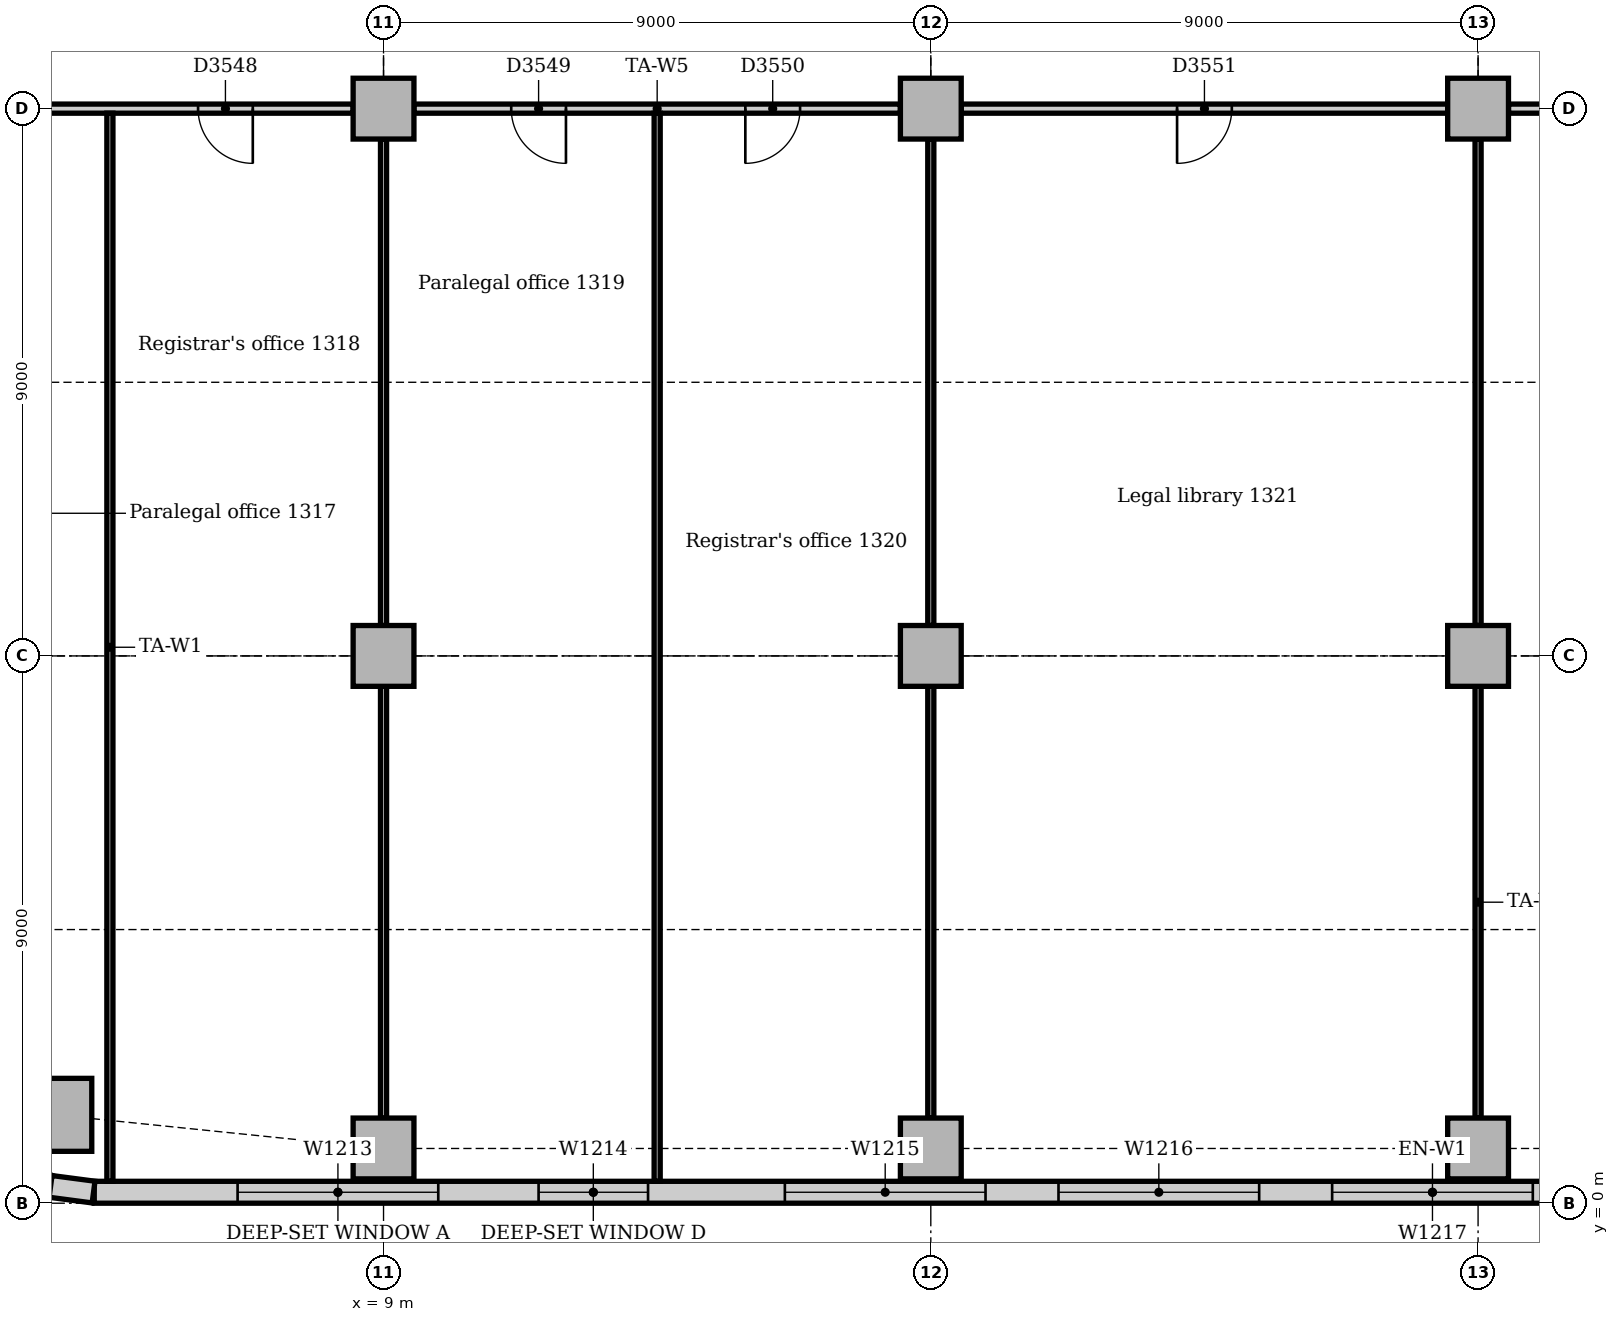
"""IFC4 building model, lengths in metres.
Left out: names, types, materials, properties, quantities, classifications, styles, units other than length and angle.
Written with IfcOpenShell. Run it as: python <this file> out.ifc"""

import sys

from ifc_helpers import new_model, si_unit, direction, frame, frame_2d, origin, origin_2d, place, context, subcontext, project, spatial, rectangle, extrude, element, fill, save


model = new_model("IFC4")
c1 = context("Model", 3, precision=1e-05, world=origin(), true_north=direction((0.0, 1.0)))
c2 = subcontext(c1, "Body", "Model", "MODEL_VIEW")
j1 = project(units=[si_unit("LENGTHUNIT", "METRE"), si_unit("PLANEANGLEUNIT", "RADIAN")], contexts=[c1])
p1 = place(None, origin())
s1 = spatial("IfcSite", under=j1, at=p1, CompositionType="ELEMENT")
p2 = place(p1, origin())
s2 = spatial("IfcBuilding", under=s1, at=p2, CompositionType="ELEMENT")
p3 = place(p2, frame((0.0, 0.0, 59.0)))
s3 = spatial("IfcBuildingStorey", under=s2, at=p3, CompositionType="ELEMENT", Elevation=59.0)
p4 = place(p3, frame((3.602, 1.453, 0.0), z_axis=(0.0, 0.0, 1.0), x_axis=(1.0, 0.0, 0.0)))
e1 = element("IfcColumn", 1, at=p4, inside=s3, PredefinedType="COLUMN", context=c2, shape_type="SweptSolid", body=[
    extrude(rectangle(XDim=1.2, YDim=1.2, at=origin_2d()), origin(), (0.0, 0.0, 1.0), 3.85),
])
for number, where, z_axis, x_axis in (
    (2, (9.0, 0.9, 0.0), (0.0, 0.0, 1.0), (1.0, 0.0, 0.0)),
    (3, (18.0, 0.9, 0.0), (0.0, 0.0, 1.0), (1.0, 0.0, 0.0)),
    (4, (27.0, 0.9, 0.0), (0.0, 0.0, 1.0), (1.0, 0.0, 0.0)),
    (5, (9.0, 9.0, 0.0), (0.0, 0.0, 1.0), (1.0, 0.0, 0.0)),
    (6, (9.0, 18.0, 0.0), (0.0, 0.0, 1.0), (1.0, 0.0, 0.0)),
    (7, (18.0, 9.0, 0.0), (0.0, 0.0, 1.0), (1.0, 0.0, 0.0)),
    (8, (18.0, 18.0, 0.0), (0.0, 0.0, 1.0), (1.0, 0.0, 0.0)),
    (9, (27.0, 9.0, 0.0), (0.0, 0.0, 1.0), (1.0, 0.0, 0.0)),
    (10, (27.0, 18.0, 0.0), (0.0, 0.0, 1.0), (1.0, 0.0, 0.0)),
):
    element("IfcColumn", number, at=place(p3, frame(where, z_axis=z_axis, x_axis=x_axis)), inside=s3, PredefinedType="COLUMN", context=c2, shape_type="SweptSolid", body=[
        extrude(rectangle(XDim=1.0, YDim=1.0, at=origin_2d()), origin(), (0.0, 0.0, 1.0), 3.85),
    ])
p5 = place(p3, frame((4.243, 0.18, 0.0), z_axis=(0.0, 0.0, 1.0), x_axis=(1.0, 0.0, 0.0)))
e11 = element("IfcWall", 11, at=p5, inside=s3, PredefinedType="STANDARD", context=c2, shape_type="SweptSolid", body=[
    extrude(rectangle(XDim=44.015, YDim=0.36, at=frame_2d((22.007, 0.0))), origin(), (0.0, 0.0, 1.0), 3.85),
])
p6 = place(p5, frame((2.357, 0.0, 0.9)))
e12 = element("IfcOpeningElement", 12, at=p6, cuts=e11, PredefinedType="OPENING", context=c2, shape_type="SweptSolid", body=[
    extrude(rectangle(XDim=3.3, YDim=1.6, at=frame_2d((1.65, 0.8))), frame((0.0, 0.19, 0.0), z_axis=(0.0, -1.0, 0.0), x_axis=(1.0, 0.0, 0.0)), (0.0, 0.0, 1.0), 0.38),
])
p7 = place(p5, frame((7.307, 0.0, 0.9)))
e13 = element("IfcOpeningElement", 13, at=p7, cuts=e11, PredefinedType="OPENING", context=c2, shape_type="SweptSolid", body=[
    extrude(rectangle(XDim=1.8, YDim=1.6, at=frame_2d((0.9, 0.8))), frame((0.0, 0.19, 0.0), z_axis=(0.0, -1.0, 0.0), x_axis=(1.0, 0.0, 0.0)), (0.0, 0.0, 1.0), 0.38),
])
p8 = place(p5, frame((11.357, 0.0, 0.9)))
e14 = element("IfcOpeningElement", 14, at=p8, cuts=e11, PredefinedType="OPENING", context=c2, shape_type="SweptSolid", body=[
    extrude(rectangle(XDim=3.3, YDim=1.6, at=frame_2d((1.65, 0.8))), frame((0.0, 0.19, 0.0), z_axis=(0.0, -1.0, 0.0), x_axis=(1.0, 0.0, 0.0)), (0.0, 0.0, 1.0), 0.38),
])
p9 = place(p5, frame((15.857, 0.0, 0.9)))
e15 = element("IfcOpeningElement", 15, at=p9, cuts=e11, PredefinedType="OPENING", context=c2, shape_type="SweptSolid", body=[
    extrude(rectangle(XDim=3.3, YDim=1.6, at=frame_2d((1.65, 0.8))), frame((0.0, 0.19, 0.0), z_axis=(0.0, -1.0, 0.0), x_axis=(1.0, 0.0, 0.0)), (0.0, 0.0, 1.0), 0.38),
])
p10 = place(p5, frame((20.357, 0.0, 0.9)))
e16 = element("IfcOpeningElement", 16, at=p10, cuts=e11, PredefinedType="OPENING", context=c2, shape_type="SweptSolid", body=[
    extrude(rectangle(XDim=3.3, YDim=1.6, at=frame_2d((1.65, 0.8))), frame((0.0, 0.19, 0.0), z_axis=(0.0, -1.0, 0.0), x_axis=(1.0, 0.0, 0.0)), (0.0, 0.0, 1.0), 0.38),
])
p11 = place(p5, frame((24.857, 0.0, 0.9)))
e17 = element("IfcOpeningElement", 17, at=p11, cuts=e11, PredefinedType="OPENING", context=c2, shape_type="SweptSolid", body=[
    extrude(rectangle(XDim=3.3, YDim=1.6, at=frame_2d((1.65, 0.8))), frame((0.0, 0.19, 0.0), z_axis=(0.0, -1.0, 0.0), x_axis=(1.0, 0.0, 0.0)), (0.0, 0.0, 1.0), 0.38),
])
p12 = place(p5, frame((29.357, 0.0, 0.9)))
e18 = element("IfcOpeningElement", 18, at=p12, cuts=e11, PredefinedType="OPENING", context=c2, shape_type="SweptSolid", body=[
    extrude(rectangle(XDim=3.3, YDim=1.6, at=frame_2d((1.65, 0.8))), frame((0.0, 0.19, 0.0), z_axis=(0.0, -1.0, 0.0), x_axis=(1.0, 0.0, 0.0)), (0.0, 0.0, 1.0), 0.38),
])
p13 = place(p5, frame((34.307, 0.0, 0.9)))
e19 = element("IfcOpeningElement", 19, at=p13, cuts=e11, PredefinedType="OPENING", context=c2, shape_type="SweptSolid", body=[
    extrude(rectangle(XDim=1.8, YDim=1.6, at=frame_2d((0.9, 0.8))), frame((0.0, 0.19, 0.0), z_axis=(0.0, -1.0, 0.0), x_axis=(1.0, 0.0, 0.0)), (0.0, 0.0, 1.0), 0.38),
])
p14 = place(p5, frame((38.357, 0.0, 0.9)))
e20 = element("IfcOpeningElement", 20, at=p14, cuts=e11, PredefinedType="OPENING", context=c2, shape_type="SweptSolid", body=[
    extrude(rectangle(XDim=3.3, YDim=1.6, at=frame_2d((1.65, 0.8))), frame((0.0, 0.19, 0.0), z_axis=(0.0, -1.0, 0.0), x_axis=(1.0, 0.0, 0.0)), (0.0, 0.0, 1.0), 0.38),
])
for number, where, z_axis, x_axis in (
    (21, (2.844, 0.555, 0.0), (0.0, 0.0, 1.0), (0.924, -0.383, 0.0)),
    (22, (3.524, 0.276, 0.0), (0.0, 0.0, 1.0), (0.991, -0.131, 0.0)),
):
    element("IfcWall", number, at=place(p3, frame(where, z_axis=z_axis, x_axis=x_axis)), inside=s3, PredefinedType="STANDARD", context=c2, shape_type="SweptSolid", body=[
        extrude(rectangle(XDim=0.713, YDim=0.36, at=frame_2d((0.356, 0.0))), origin(), (0.0, 0.0, 1.0), 3.85),
    ])
p15 = place(p3, frame((27.5, 18.0, 0.0), z_axis=(0.0, 0.0, 1.0), x_axis=(1.0, 0.0, 0.0)))
e23 = element("IfcWall", 23, at=p15, inside=s3, PredefinedType="PARTITIONING", context=c2, shape_type="SweptSolid", body=[
    extrude(rectangle(XDim=8.0, YDim=0.15, at=frame_2d((4.0, 0.0))), origin(), (0.0, 0.0, 1.0), 3.15),
])
p16 = place(p15, frame((3.55, 0.0, 0.0)))
e24 = element("IfcOpeningElement", 24, at=p16, cuts=e23, PredefinedType="OPENING", context=c2, shape_type="SweptSolid", body=[
    extrude(rectangle(XDim=0.9, YDim=2.1, at=frame_2d((0.45, 1.05))), frame((0.0, 0.085, 0.0), z_axis=(0.0, -1.0, 0.0), x_axis=(1.0, 0.0, 0.0)), (0.0, 0.0, 1.0), 0.17),
])
p17 = place(p3, frame((18.5, 18.0, 0.0), z_axis=(0.0, 0.0, 1.0), x_axis=(1.0, 0.0, 0.0)))
e25 = element("IfcWall", 25, at=p17, inside=s3, PredefinedType="PARTITIONING", context=c2, shape_type="SweptSolid", body=[
    extrude(rectangle(XDim=8.0, YDim=0.15, at=frame_2d((4.0, 0.0))), origin(), (0.0, 0.0, 1.0), 3.15),
])
p18 = place(p17, frame((3.55, 0.0, 0.0)))
e26 = element("IfcOpeningElement", 26, at=p18, cuts=e25, PredefinedType="OPENING", context=c2, shape_type="SweptSolid", body=[
    extrude(rectangle(XDim=0.9, YDim=2.1, at=frame_2d((0.45, 1.05))), frame((0.0, 0.085, 0.0), z_axis=(0.0, -1.0, 0.0), x_axis=(1.0, 0.0, 0.0)), (0.0, 0.0, 1.0), 0.17),
])
p19 = place(p3, frame((9.5, 18.0, 0.0), z_axis=(0.0, 0.0, 1.0), x_axis=(1.0, 0.0, 0.0)))
e27 = element("IfcWall", 27, at=p19, inside=s3, PredefinedType="PARTITIONING", context=c2, shape_type="SweptSolid", body=[
    extrude(rectangle(XDim=8.0, YDim=0.15, at=frame_2d((4.0, 0.0))), origin(), (0.0, 0.0, 1.0), 3.15),
])
p20 = place(p19, frame((1.6, 0.0, 0.0)))
e28 = element("IfcOpeningElement", 28, at=p20, cuts=e27, PredefinedType="OPENING", context=c2, shape_type="SweptSolid", body=[
    extrude(rectangle(XDim=0.9, YDim=2.1, at=frame_2d((0.45, 1.05))), frame((0.0, 0.085, 0.0), z_axis=(0.0, -1.0, 0.0), x_axis=(1.0, 0.0, 0.0)), (0.0, 0.0, 1.0), 0.17),
])
p21 = place(p19, frame((5.45, 0.0, 0.0)))
e29 = element("IfcOpeningElement", 29, at=p21, cuts=e27, PredefinedType="OPENING", context=c2, shape_type="SweptSolid", body=[
    extrude(rectangle(XDim=0.9, YDim=2.1, at=frame_2d((0.45, 1.05))), frame((0.0, 0.085, 0.0), z_axis=(0.0, -1.0, 0.0), x_axis=(1.0, 0.0, 0.0)), (0.0, 0.0, 1.0), 0.17),
])
p22 = place(p3, frame((1.4, 18.0, 0.0), z_axis=(0.0, 0.0, 1.0), x_axis=(1.0, 0.0, 0.0)))
e30 = element("IfcWall", 30, at=p22, inside=s3, PredefinedType="PARTITIONING", context=c2, shape_type="SweptSolid", body=[
    extrude(rectangle(XDim=7.1, YDim=0.15, at=frame_2d((3.55, 0.0))), origin(), (0.0, 0.0, 1.0), 3.15),
])
p23 = place(p22, frame((1.15, 0.0, 0.0)))
e31 = element("IfcOpeningElement", 31, at=p23, cuts=e30, PredefinedType="OPENING", context=c2, shape_type="SweptSolid", body=[
    extrude(rectangle(XDim=0.9, YDim=2.1, at=frame_2d((0.45, 1.05))), frame((0.0, 0.085, 0.0), z_axis=(0.0, -1.0, 0.0), x_axis=(1.0, 0.0, 0.0)), (0.0, 0.0, 1.0), 0.17),
])
p24 = place(p22, frame((4.55, 0.0, 0.0)))
e32 = element("IfcOpeningElement", 32, at=p24, cuts=e30, PredefinedType="OPENING", context=c2, shape_type="SweptSolid", body=[
    extrude(rectangle(XDim=0.9, YDim=2.1, at=frame_2d((0.45, 1.05))), frame((0.0, 0.085, 0.0), z_axis=(0.0, -1.0, 0.0), x_axis=(1.0, 0.0, 0.0)), (0.0, 0.0, 1.0), 0.17),
])
p25 = place(p3, frame((4.5, 0.36, 0.0), z_axis=(0.0, 0.0, 1.0), x_axis=(0.0, 1.0, 0.0)))
e33 = element("IfcWall", 33, at=p25, inside=s3, PredefinedType="PARTITIONING", context=c2, shape_type="SweptSolid", body=[
    extrude(rectangle(XDim=17.565, YDim=0.1, at=frame_2d((8.783, 0.0))), origin(), (0.0, 0.0, 1.0), 3.85),
])
p26 = place(p3, frame((9.0, 1.4, 0.0), z_axis=(0.0, 0.0, 1.0), x_axis=(0.0, 1.0, 0.0)))
e34 = element("IfcWall", 34, at=p26, inside=s3, PredefinedType="PARTITIONING", context=c2, shape_type="SweptSolid", body=[
    extrude(rectangle(XDim=7.1, YDim=0.1, at=frame_2d((3.55, 0.0))), origin(), (0.0, 0.0, 1.0), 3.158),
])
p27 = place(p3, frame((9.0, 9.5, 0.0), z_axis=(0.0, 0.0, 1.0), x_axis=(0.0, 1.0, 0.0)))
e35 = element("IfcWall", 35, at=p27, inside=s3, PredefinedType="PARTITIONING", context=c2, shape_type="SweptSolid", body=[
    extrude(rectangle(XDim=8.0, YDim=0.1, at=frame_2d((4.0, 0.0))), origin(), (0.0, 0.0, 1.0), 3.158),
])
p28 = place(p3, frame((13.5, 0.36, 0.0), z_axis=(0.0, 0.0, 1.0), x_axis=(0.0, 1.0, 0.0)))
e36 = element("IfcWall", 36, at=p28, inside=s3, PredefinedType="PARTITIONING", context=c2, shape_type="SweptSolid", body=[
    extrude(rectangle(XDim=17.565, YDim=0.1, at=frame_2d((8.783, 0.0))), origin(), (0.0, 0.0, 1.0), 3.85),
])
p29 = place(p3, frame((18.0, 1.4, 0.0), z_axis=(0.0, 0.0, 1.0), x_axis=(0.0, 1.0, 0.0)))
e37 = element("IfcWall", 37, at=p29, inside=s3, PredefinedType="PARTITIONING", context=c2, shape_type="SweptSolid", body=[
    extrude(rectangle(XDim=7.1, YDim=0.1, at=frame_2d((3.55, 0.0))), origin(), (0.0, 0.0, 1.0), 3.158),
])
p30 = place(p3, frame((18.0, 9.5, 0.0), z_axis=(0.0, 0.0, 1.0), x_axis=(0.0, 1.0, 0.0)))
e38 = element("IfcWall", 38, at=p30, inside=s3, PredefinedType="PARTITIONING", context=c2, shape_type="SweptSolid", body=[
    extrude(rectangle(XDim=8.0, YDim=0.1, at=frame_2d((4.0, 0.0))), origin(), (0.0, 0.0, 1.0), 3.158),
])
p31 = place(p3, frame((27.0, 1.4, 0.0), z_axis=(0.0, 0.0, 1.0), x_axis=(0.0, 1.0, 0.0)))
e39 = element("IfcWall", 39, at=p31, inside=s3, PredefinedType="PARTITIONING", context=c2, shape_type="SweptSolid", body=[
    extrude(rectangle(XDim=7.1, YDim=0.1, at=frame_2d((3.55, 0.0))), origin(), (0.0, 0.0, 1.0), 3.158),
])
p32 = place(p3, frame((27.0, 9.5, 0.0), z_axis=(0.0, 0.0, 1.0), x_axis=(0.0, 1.0, 0.0)))
e40 = element("IfcWall", 40, at=p32, inside=s3, PredefinedType="PARTITIONING", context=c2, shape_type="SweptSolid", body=[
    extrude(rectangle(XDim=8.0, YDim=0.1, at=frame_2d((4.0, 0.0))), origin(), (0.0, 0.0, 1.0), 3.158),
])
p33 = place(p6, origin())
e41 = element("IfcWindow", 41, at=p33, inside=s3, PartitioningType="SINGLE_PANEL", PredefinedType="WINDOW", context=c2, shape_type="SweptSolid", body=[
    extrude(rectangle(XDim=3.3, YDim=1.6, at=frame_2d((1.65, 0.8))), frame((0.0, 0.13, 0.0), z_axis=(0.0, -1.0, 0.0), x_axis=(1.0, 0.0, 0.0)), (0.0, 0.0, 1.0), 0.06),
])
fill(e12, e41)
p34 = place(p7, origin())
e42 = element("IfcWindow", 42, at=p34, inside=s3, PartitioningType="SINGLE_PANEL", PredefinedType="WINDOW", context=c2, shape_type="SweptSolid", body=[
    extrude(rectangle(XDim=1.8, YDim=1.6, at=frame_2d((0.9, 0.8))), frame((0.0, 0.13, 0.0), z_axis=(0.0, -1.0, 0.0), x_axis=(1.0, 0.0, 0.0)), (0.0, 0.0, 1.0), 0.06),
])
fill(e13, e42)
p35 = place(p8, origin())
e43 = element("IfcWindow", 43, at=p35, inside=s3, PartitioningType="SINGLE_PANEL", PredefinedType="WINDOW", context=c2, shape_type="SweptSolid", body=[
    extrude(rectangle(XDim=3.3, YDim=1.6, at=frame_2d((1.65, 0.8))), frame((0.0, 0.13, 0.0), z_axis=(0.0, -1.0, 0.0), x_axis=(1.0, 0.0, 0.0)), (0.0, 0.0, 1.0), 0.06),
])
fill(e14, e43)
p36 = place(p9, origin())
e44 = element("IfcWindow", 44, at=p36, inside=s3, PartitioningType="SINGLE_PANEL", PredefinedType="WINDOW", context=c2, shape_type="SweptSolid", body=[
    extrude(rectangle(XDim=3.3, YDim=1.6, at=frame_2d((1.65, 0.8))), frame((0.0, 0.13, 0.0), z_axis=(0.0, -1.0, 0.0), x_axis=(1.0, 0.0, 0.0)), (0.0, 0.0, 1.0), 0.06),
])
fill(e15, e44)
p37 = place(p10, origin())
e45 = element("IfcWindow", 45, at=p37, inside=s3, PartitioningType="SINGLE_PANEL", PredefinedType="WINDOW", context=c2, shape_type="SweptSolid", body=[
    extrude(rectangle(XDim=3.3, YDim=1.6, at=frame_2d((1.65, 0.8))), frame((0.0, 0.13, 0.0), z_axis=(0.0, -1.0, 0.0), x_axis=(1.0, 0.0, 0.0)), (0.0, 0.0, 1.0), 0.06),
])
fill(e16, e45)
p38 = place(p24, frame((0.9, 0.0, 0.0), z_axis=(0.0, 0.0, 1.0), x_axis=(-1.0, 0.0, 0.0)))
e46 = element("IfcDoor", 46, at=p38, inside=s3, OperationType="SINGLE_SWING_LEFT", PredefinedType="DOOR", context=c2, shape_type="SweptSolid", body=[
    extrude(rectangle(XDim=0.9, YDim=2.1, at=frame_2d((0.45, 1.05))), frame((0.0, 0.025, 0.0), z_axis=(0.0, -1.0, 0.0), x_axis=(1.0, 0.0, 0.0)), (0.0, 0.0, 1.0), 0.05),
])
fill(e32, e46)
p39 = place(p20, frame((0.9, 0.0, 0.0), z_axis=(0.0, 0.0, 1.0), x_axis=(-1.0, 0.0, 0.0)))
e47 = element("IfcDoor", 47, at=p39, inside=s3, OperationType="SINGLE_SWING_LEFT", PredefinedType="DOOR", context=c2, shape_type="SweptSolid", body=[
    extrude(rectangle(XDim=0.9, YDim=2.1, at=frame_2d((0.45, 1.05))), frame((0.0, 0.025, 0.0), z_axis=(0.0, -1.0, 0.0), x_axis=(1.0, 0.0, 0.0)), (0.0, 0.0, 1.0), 0.05),
])
fill(e28, e47)
p40 = place(p21, frame((0.9, 0.0, 0.0), z_axis=(0.0, 0.0, 1.0), x_axis=(-1.0, 0.0, 0.0)))
e48 = element("IfcDoor", 48, at=p40, inside=s3, OperationType="SINGLE_SWING_RIGHT", PredefinedType="DOOR", context=c2, shape_type="SweptSolid", body=[
    extrude(rectangle(XDim=0.9, YDim=2.1, at=frame_2d((0.45, 1.05))), frame((0.0, 0.025, 0.0), z_axis=(0.0, -1.0, 0.0), x_axis=(1.0, 0.0, 0.0)), (0.0, 0.0, 1.0), 0.05),
])
fill(e29, e48)
p41 = place(p18, frame((0.9, 0.0, 0.0), z_axis=(0.0, 0.0, 1.0), x_axis=(-1.0, 0.0, 0.0)))
e49 = element("IfcDoor", 49, at=p41, inside=s3, OperationType="SINGLE_SWING_RIGHT", PredefinedType="DOOR", context=c2, shape_type="SweptSolid", body=[
    extrude(rectangle(XDim=0.9, YDim=2.1, at=frame_2d((0.45, 1.05))), frame((0.0, 0.025, 0.0), z_axis=(0.0, -1.0, 0.0), x_axis=(1.0, 0.0, 0.0)), (0.0, 0.0, 1.0), 0.05),
])
fill(e26, e49)
save(model, sys.argv[1])
